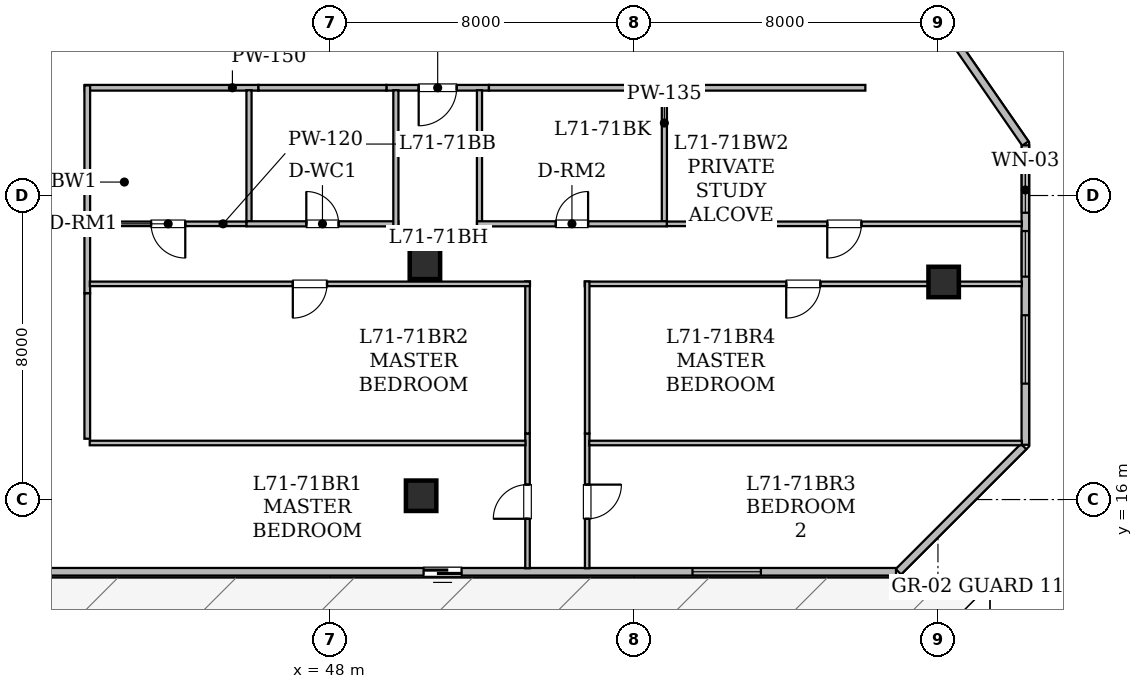
"""IFC4 building model, lengths in metres.
Left out: names, types, materials, properties, quantities, classifications, styles, units other than length and angle.
Written with IfcOpenShell. Run it as: python <this file> out.ifc"""

import sys

from ifc_helpers import new_model, si_unit, direction, frame, frame_2d, origin, origin_2d, place, context, subcontext, project, spatial, rectangle, hollow_rectangle, extrude, element, fill, save


model = new_model("IFC4")
c1 = context("Model", 3, precision=1e-05, world=origin(), true_north=direction((0.0, 1.0)))
c2 = subcontext(c1, "Body", "Model", "MODEL_VIEW")
j1 = project(units=[si_unit("LENGTHUNIT", "METRE"), si_unit("PLANEANGLEUNIT", "RADIAN")], contexts=[c1])
p1 = place(None, origin())
s1 = spatial("IfcSite", under=j1, at=p1, CompositionType="ELEMENT")
p2 = place(p1, origin())
s2 = spatial("IfcBuilding", under=s1, at=p2, CompositionType="ELEMENT")
p3 = place(p2, frame((0.0, 0.0, 277.85)))
s3 = spatial("IfcBuildingStorey", under=s2, at=p3, CompositionType="ELEMENT", Elevation=277.85)
for number, where, z_axis, x_axis in (
    (1, (50.4, 16.1, 0.025), (0.0, 0.0, 1.0), (1.0, 0.0, 0.0)),
    (2, (61.2, 16.1, 0.025), (0.0, 0.0, 1.0), (1.0, 0.0, 0.0)),
    (3, (64.15, 21.725, 0.025), (0.0, 0.0, 1.0), (1.0, 0.0, 0.0)),
):
    element("IfcColumn", number, at=place(p3, frame(where, z_axis=z_axis, x_axis=x_axis)), inside=s3, PredefinedType="COLUMN", context=c2, shape_type="SweptSolid", body=[
        extrude(hollow_rectangle(XDim=0.8, YDim=0.8, WallThickness=0.04, at=origin_2d()), origin(), (0.0, 0.0, 1.0), 4.175),
    ])
p4 = place(p3, frame((50.5, 22.2, 0.0), z_axis=(0.0, 0.0, 1.0), x_axis=(1.0, 0.0, 0.0)))
e4 = element("IfcColumn", 4, at=p4, inside=s3, PredefinedType="COLUMN", context=c2, shape_type="SweptSolid", body=[
    extrude(hollow_rectangle(XDim=0.8, YDim=0.8, WallThickness=0.04, at=origin_2d()), origin(), (0.0, 0.0, 1.0), 4.2),
])
p5 = place(p3, frame((64.526, 27.931, 0.0), z_axis=(0.0, 0.0, 1.0), x_axis=(0.569311819154, -0.822121677473, 0.0)))
e5 = element("IfcWall", 5, at=p5, inside=s3, PredefinedType="STANDARD", context=c2, shape_type="SweptSolid", body=[
    extrude(rectangle(XDim=3.116, YDim=0.2, at=frame_2d((1.558, 0.0))), origin(), (0.0, 0.0, 1.0), 3.95),
])
p6 = place(p3, frame((66.3, 25.321, 0.0), z_axis=(0.0, 0.0, 1.0), x_axis=(0.0, -1.0, 0.0)))
e6 = element("IfcWall", 6, at=p6, inside=s3, PredefinedType="STANDARD", context=c2, shape_type="SweptSolid", body=[
    extrude(rectangle(XDim=7.88, YDim=0.2, at=frame_2d((3.94, 0.0))), origin(), (0.0, 0.0, 1.0), 3.95),
])
p7 = place(p6, frame((0.575, 0.0, 0.78)))
e7 = element("IfcOpeningElement", 7, at=p7, cuts=e6, PredefinedType="OPENING", context=c2, shape_type="SweptSolid", body=[
    extrude(rectangle(XDim=1.2, YDim=1.5, at=frame_2d((0.6, 0.75))), frame((0.0, 0.11, 0.0), z_axis=(0.0, -1.0, 0.0), x_axis=(1.0, 0.0, 0.0)), (0.0, 0.0, 1.0), 0.22),
])
p8 = place(p6, frame((2.256, 0.0, 0.78)))
e8 = element("IfcOpeningElement", 8, at=p8, cuts=e6, PredefinedType="OPENING", context=c2, shape_type="SweptSolid", body=[
    extrude(rectangle(XDim=1.2, YDim=1.5, at=frame_2d((0.6, 0.75))), frame((0.0, 0.11, 0.0), z_axis=(0.0, -1.0, 0.0), x_axis=(1.0, 0.0, 0.0)), (0.0, 0.0, 1.0), 0.22),
])
p9 = place(p6, frame((4.471, 0.0, 0.85)))
e9 = element("IfcOpeningElement", 9, at=p9, cuts=e6, PredefinedType="OPENING", context=c2, shape_type="SweptSolid", body=[
    extrude(rectangle(XDim=1.8, YDim=0.92, at=frame_2d((0.9, 0.46))), frame((0.0, 0.11, 0.0), z_axis=(0.0, -1.0, 0.0), x_axis=(1.0, 0.0, 0.0)), (0.0, 0.0, 1.0), 0.22),
])
p10 = place(p3, frame((66.255, 17.396, 0.0), z_axis=(0.0, 0.0, 1.0), x_axis=(-0.707106781187, -0.707106781187, 0.0)))
e10 = element("IfcWall", 10, at=p10, inside=s3, PredefinedType="STANDARD", context=c2, shape_type="SweptSolid", body=[
    extrude(rectangle(XDim=4.661, YDim=0.2, at=frame_2d((2.331, 0.0))), origin(), (0.0, 0.0, 1.0), 3.95),
])
p11 = place(p3, frame((62.896, 14.1, 0.0), z_axis=(0.0, 0.0, 1.0), x_axis=(-1.0, 0.0, 0.0)))
e11 = element("IfcWall", 11, at=p11, inside=s3, PredefinedType="STANDARD", context=c2, shape_type="SweptSolid", body=[
    extrude(rectangle(XDim=35.793, YDim=0.2, at=frame_2d((17.896, 0.0))), origin(), (0.0, 0.0, 1.0), 3.95),
])
p12 = place(p11, frame((11.431, 0.0, 0.0)))
e12 = element("IfcOpeningElement", 12, at=p12, cuts=e11, PredefinedType="OPENING", context=c2, shape_type="SweptSolid", body=[
    extrude(rectangle(XDim=1.0, YDim=2.15, at=frame_2d((0.5, 1.075))), frame((0.0, 0.11, 0.0), z_axis=(0.0, -1.0, 0.0), x_axis=(1.0, 0.0, 0.0)), (0.0, 0.0, 1.0), 0.22),
])
p13 = place(p11, frame((3.555, 0.0, 0.85)))
e13 = element("IfcOpeningElement", 13, at=p13, cuts=e11, PredefinedType="OPENING", context=c2, shape_type="SweptSolid", body=[
    extrude(rectangle(XDim=1.8, YDim=0.92, at=frame_2d((0.9, 0.46))), frame((0.0, 0.11, 0.0), z_axis=(0.0, -1.0, 0.0), x_axis=(1.0, 0.0, 0.0)), (0.0, 0.0, 1.0), 0.22),
])
p14 = place(p3, frame((46.12, 26.835, 0.0), z_axis=(0.0, 0.0, 1.0), x_axis=(-1.0, 0.0, 0.0)))
e14 = element("IfcWall", 14, at=p14, inside=s3, PredefinedType="STANDARD", context=c2, shape_type="SweptSolid", body=[
    extrude(rectangle(XDim=4.57, YDim=0.15, at=frame_2d((2.285, 0.0))), origin(), (0.0, 0.0, 1.0), 3.95),
])
p15 = place(p3, frame((41.615, 26.898, 0.0), z_axis=(0.0, 0.0, 1.0), x_axis=(0.0, -1.0, 0.0)))
e15 = element("IfcWall", 15, at=p15, inside=s3, PredefinedType="STANDARD", context=c2, shape_type="SweptSolid", body=[
    extrude(rectangle(XDim=3.892, YDim=0.15, at=frame_2d((1.946, 0.0))), origin(), (0.0, 0.0, 1.0), 3.245),
])
p16 = place(p3, frame((62.09, 26.835, 0.0), z_axis=(0.0, 0.0, 1.0), x_axis=(-1.0, 0.0, 0.0)))
e16 = element("IfcWall", 16, at=p16, inside=s3, PredefinedType="STANDARD", context=c2, shape_type="SweptSolid", body=[
    extrude(rectangle(XDim=5.538, YDim=0.15, at=frame_2d((2.769, 0.0))), origin(), (0.0, 0.0, 1.0), 3.95),
])
p17 = place(p3, frame((52.185, 26.835, 0.0), z_axis=(0.0, 0.0, 1.0), x_axis=(-1.0, 0.0, 0.0)))
e17 = element("IfcWall", 17, at=p17, inside=s3, PredefinedType="STANDARD", context=c2, shape_type="SweptSolid", body=[
    extrude(rectangle(XDim=2.698, YDim=0.15, at=frame_2d((1.349, 0.0))), origin(), (0.0, 0.0, 1.0), 3.245),
])
p18 = place(p17, frame((0.849, 0.0, 0.0)))
e18 = element("IfcOpeningElement", 18, at=p18, cuts=e17, PredefinedType="OPENING", context=c2, shape_type="SweptSolid", body=[
    extrude(rectangle(XDim=1.0, YDim=2.15, at=frame_2d((0.5, 1.075))), frame((0.0, 0.085, 0.0), z_axis=(0.0, -1.0, 0.0), x_axis=(1.0, 0.0, 0.0)), (0.0, 0.0, 1.0), 0.17),
])
p19 = place(p3, frame((41.615, 23.006, 0.0), z_axis=(0.0, 0.0, 1.0), x_axis=(0.0, -1.0, 0.0)))
e19 = element("IfcWall", 19, at=p19, inside=s3, PredefinedType="STANDARD", context=c2, shape_type="SweptSolid", body=[
    extrude(rectangle(XDim=1.58, YDim=0.15, at=frame_2d((0.79, 0.0))), origin(), (0.0, 0.0, 1.0), 3.95),
])
p20 = place(p3, frame((49.487, 26.835, 0.0), z_axis=(0.0, 0.0, 1.0), x_axis=(-1.0, 0.0, 0.0)))
e20 = element("IfcWall", 20, at=p20, inside=s3, PredefinedType="STANDARD", context=c2, shape_type="SweptSolid", body=[
    extrude(rectangle(XDim=3.367, YDim=0.15, at=frame_2d((1.684, 0.0))), origin(), (0.0, 0.0, 1.0), 3.95),
])
p21 = place(p3, frame((56.552, 26.835, 0.0), z_axis=(0.0, 0.0, 1.0), x_axis=(-1.0, 0.0, 0.0)))
e21 = element("IfcWall", 21, at=p21, inside=s3, PredefinedType="STANDARD", context=c2, shape_type="SweptSolid", body=[
    extrude(rectangle(XDim=4.367, YDim=0.15, at=frame_2d((2.184, 0.0))), origin(), (0.0, 0.0, 1.0), 3.95),
])
p22 = place(p3, frame((41.615, 21.426, 0.0), z_axis=(0.0, 0.0, 1.0), x_axis=(0.0, -1.0, 0.0)))
e22 = element("IfcWall", 22, at=p22, inside=s3, PredefinedType="STANDARD", context=c2, shape_type="SweptSolid", body=[
    extrude(rectangle(XDim=3.826, YDim=0.15, at=frame_2d((1.913, 0.0))), origin(), (0.0, 0.0, 1.0), 3.95),
])
p23 = place(p3, frame((45.806, 23.255, 0.0), z_axis=(0.0, 0.0, 1.0), x_axis=(-1.0, 0.0, 0.0)))
e23 = element("IfcWall", 23, at=p23, inside=s3, PredefinedType="PARTITIONING", context=c2, shape_type="SweptSolid", body=[
    extrude(rectangle(XDim=4.124, YDim=0.12, at=frame_2d((2.062, 0.0))), origin(), (0.0, 0.0, 1.0), 3.245),
])
p24 = place(p23, frame((1.612, 0.0, 0.0)))
e24 = element("IfcOpeningElement", 24, at=p24, cuts=e23, PredefinedType="OPENING", context=c2, shape_type="SweptSolid", body=[
    extrude(rectangle(XDim=0.9, YDim=2.1, at=frame_2d((0.45, 1.05))), frame((0.0, 0.07, 0.0), z_axis=(0.0, -1.0, 0.0), x_axis=(1.0, 0.0, 0.0)), (0.0, 0.0, 1.0), 0.14),
])
p25 = place(p3, frame((45.871, 26.77, 0.0), z_axis=(0.0, 0.0, 1.0), x_axis=(0.0, -1.0, 0.0)))
e25 = element("IfcWall", 25, at=p25, inside=s3, PredefinedType="PARTITIONING", context=c2, shape_type="SweptSolid", body=[
    extrude(rectangle(XDim=3.45, YDim=0.135, at=frame_2d((1.725, 0.0))), origin(), (0.0, 0.0, 1.0), 3.95),
])
p26 = place(p3, frame((66.208, 23.255, 0.0), z_axis=(0.0, 0.0, 1.0), x_axis=(-1.0, 0.0, 0.0)))
e26 = element("IfcWall", 26, at=p26, inside=s3, PredefinedType="PARTITIONING", context=c2, shape_type="SweptSolid", body=[
    extrude(rectangle(XDim=9.342, YDim=0.12, at=frame_2d((4.671, 0.0))), origin(), (0.0, 0.0, 1.0), 3.407),
])
p27 = place(p26, frame((4.221, 0.0, 0.0)))
e27 = element("IfcOpeningElement", 27, at=p27, cuts=e26, PredefinedType="OPENING", context=c2, shape_type="SweptSolid", body=[
    extrude(rectangle(XDim=0.9, YDim=2.1, at=frame_2d((0.45, 1.05))), frame((0.0, 0.07, 0.0), z_axis=(0.0, -1.0, 0.0), x_axis=(1.0, 0.0, 0.0)), (0.0, 0.0, 1.0), 0.14),
])
p28 = place(p3, frame((56.801, 23.32, 0.0), z_axis=(0.0, 0.0, 1.0), x_axis=(0.0, 1.0, 0.0)))
e28 = element("IfcWall", 28, at=p28, inside=s3, PredefinedType="PARTITIONING", context=c2, shape_type="SweptSolid", body=[
    extrude(rectangle(XDim=3.45, YDim=0.135, at=frame_2d((1.725, 0.0))), origin(), (0.0, 0.0, 1.0), 3.95),
])
p29 = place(p3, frame((45.806, 23.255, 0.0), z_axis=(0.0, 0.0, 1.0), x_axis=(1.0, 0.0, 0.0)))
e29 = element("IfcWall", 29, at=p29, inside=s3, PredefinedType="PARTITIONING", context=c2, shape_type="SweptSolid", body=[
    extrude(rectangle(XDim=3.995, YDim=0.135, at=frame_2d((1.998, 0.0))), origin(), (0.0, 0.0, 1.0), 3.245),
])
p30 = place(p29, frame((1.573, 0.0, 0.0)))
e30 = element("IfcOpeningElement", 30, at=p30, cuts=e29, PredefinedType="OPENING", context=c2, shape_type="SweptSolid", body=[
    extrude(rectangle(XDim=0.85, YDim=2.1, at=frame_2d((0.425, 1.05))), frame((0.0, 0.077, 0.0), z_axis=(0.0, -1.0, 0.0), x_axis=(1.0, 0.0, 0.0)), (0.0, 0.0, 1.0), 0.155),
])
for number, where, z_axis, x_axis in (
    (31, (49.736, 23.19, 0.0), (0.0, 0.0, 1.0), (0.0, 1.0, 0.0)),
    (32, (51.936, 26.77, 0.0), (0.0, 0.0, 1.0), (0.0, -1.0, 0.0)),
):
    element("IfcWall", number, at=place(p3, frame(where, z_axis=z_axis, x_axis=x_axis)), inside=s3, PredefinedType="PARTITIONING", context=c2, shape_type="SweptSolid", body=[
        extrude(rectangle(XDim=3.58, YDim=0.135, at=frame_2d((1.79, 0.0))), origin(), (0.0, 0.0, 1.0), 3.95),
    ])
p31 = place(p3, frame((51.871, 23.255, 0.0), z_axis=(0.0, 0.0, 1.0), x_axis=(1.0, 0.0, 0.0)))
e33 = element("IfcWall", 33, at=p31, inside=s3, PredefinedType="PARTITIONING", context=c2, shape_type="SweptSolid", body=[
    extrude(rectangle(XDim=4.995, YDim=0.135, at=frame_2d((2.498, 0.0))), origin(), (0.0, 0.0, 1.0), 3.95),
])
p32 = place(p31, frame((2.073, 0.0, 0.0)))
e34 = element("IfcOpeningElement", 34, at=p32, cuts=e33, PredefinedType="OPENING", context=c2, shape_type="SweptSolid", body=[
    extrude(rectangle(XDim=0.85, YDim=2.1, at=frame_2d((0.425, 1.05))), frame((0.0, 0.077, 0.0), z_axis=(0.0, -1.0, 0.0), x_axis=(1.0, 0.0, 0.0)), (0.0, 0.0, 1.0), 0.155),
])
p33 = place(p3, frame((53.2, 14.192, 0.0), z_axis=(0.0, 0.0, 1.0), x_axis=(0.0, 1.0, 0.0)))
e35 = element("IfcWall", 35, at=p33, inside=s3, PredefinedType="PARTITIONING", context=c2, shape_type="SweptSolid", body=[
    extrude(rectangle(XDim=3.546, YDim=0.12, at=frame_2d((1.773, 0.0))), origin(), (0.0, 0.0, 1.0), 3.407),
])
p34 = place(p33, frame((1.302, 0.0, 0.0)))
e36 = element("IfcOpeningElement", 36, at=p34, cuts=e35, PredefinedType="OPENING", context=c2, shape_type="SweptSolid", body=[
    extrude(rectangle(XDim=0.9, YDim=2.1, at=frame_2d((0.45, 1.05))), frame((0.0, 0.07, 0.0), z_axis=(0.0, -1.0, 0.0), x_axis=(1.0, 0.0, 0.0)), (0.0, 0.0, 1.0), 0.14),
])
p35 = place(p3, frame((53.2, 17.738, 0.0), z_axis=(0.0, 0.0, 1.0), x_axis=(0.0, 1.0, 0.0)))
e37 = element("IfcWall", 37, at=p35, inside=s3, PredefinedType="PARTITIONING", context=c2, shape_type="SweptSolid", body=[
    extrude(rectangle(XDim=4.002, YDim=0.12, at=frame_2d((2.001, 0.0))), origin(), (0.0, 0.0, 1.0), 3.245),
])
p36 = place(p3, frame((53.265, 21.675, 0.0), z_axis=(0.0, 0.0, 1.0), x_axis=(-1.0, 0.0, 0.0)))
e38 = element("IfcWall", 38, at=p36, inside=s3, PredefinedType="PARTITIONING", context=c2, shape_type="SweptSolid", body=[
    extrude(rectangle(XDim=11.583, YDim=0.12, at=frame_2d((5.792, 0.0))), origin(), (0.0, 0.0, 1.0), 3.245),
])
p37 = place(p36, frame((5.341, 0.0, 0.0)))
e39 = element("IfcOpeningElement", 39, at=p37, cuts=e38, PredefinedType="OPENING", context=c2, shape_type="SweptSolid", body=[
    extrude(rectangle(XDim=0.9, YDim=2.1, at=frame_2d((0.45, 1.05))), frame((0.0, 0.07, 0.0), z_axis=(0.0, -1.0, 0.0), x_axis=(1.0, 0.0, 0.0)), (0.0, 0.0, 1.0), 0.14),
])
p38 = place(p3, frame((54.77, 17.738, 0.0), z_axis=(0.0, 0.0, 1.0), x_axis=(0.0, -1.0, 0.0)))
e40 = element("IfcWall", 40, at=p38, inside=s3, PredefinedType="PARTITIONING", context=c2, shape_type="SweptSolid", body=[
    extrude(rectangle(XDim=3.546, YDim=0.12, at=frame_2d((1.773, 0.0))), origin(), (0.0, 0.0, 1.0), 3.407),
])
p39 = place(p38, frame((1.345, 0.0, 0.0)))
e41 = element("IfcOpeningElement", 41, at=p39, cuts=e40, PredefinedType="OPENING", context=c2, shape_type="SweptSolid", body=[
    extrude(rectangle(XDim=0.9, YDim=2.1, at=frame_2d((0.45, 1.05))), frame((0.0, 0.07, 0.0), z_axis=(0.0, -1.0, 0.0), x_axis=(1.0, 0.0, 0.0)), (0.0, 0.0, 1.0), 0.14),
])
p40 = place(p3, frame((66.208, 21.675, 0.0), z_axis=(0.0, 0.0, 1.0), x_axis=(-1.0, 0.0, 0.0)))
e42 = element("IfcWall", 42, at=p40, inside=s3, PredefinedType="PARTITIONING", context=c2, shape_type="SweptSolid", body=[
    extrude(rectangle(XDim=11.503, YDim=0.12, at=frame_2d((5.751, 0.0))), origin(), (0.0, 0.0, 1.0), 3.245),
])
p41 = place(p40, frame((5.301, 0.0, 0.0)))
e43 = element("IfcOpeningElement", 43, at=p41, cuts=e42, PredefinedType="OPENING", context=c2, shape_type="SweptSolid", body=[
    extrude(rectangle(XDim=0.9, YDim=2.1, at=frame_2d((0.45, 1.05))), frame((0.0, 0.07, 0.0), z_axis=(0.0, -1.0, 0.0), x_axis=(1.0, 0.0, 0.0)), (0.0, 0.0, 1.0), 0.14),
])
p42 = place(p3, frame((54.77, 21.74, 0.0), z_axis=(0.0, 0.0, 1.0), x_axis=(0.0, -1.0, 0.0)))
e44 = element("IfcWall", 44, at=p42, inside=s3, PredefinedType="PARTITIONING", context=c2, shape_type="SweptSolid", body=[
    extrude(rectangle(XDim=4.002, YDim=0.12, at=frame_2d((2.001, 0.0))), origin(), (0.0, 0.0, 1.0), 3.245),
])
p43 = place(p3, frame((41.68, 17.488, 0.0), z_axis=(0.0, 0.0, 1.0), x_axis=(1.0, 0.0, 0.0)))
e45 = element("IfcWall", 45, at=p43, inside=s3, PredefinedType="PARTITIONING", context=c2, shape_type="SweptSolid", body=[
    extrude(rectangle(XDim=11.466, YDim=0.12, at=frame_2d((5.733, 0.0))), origin(), (0.0, 0.0, 1.0), 3.245),
])
p44 = place(p3, frame((54.824, 17.488, 0.0), z_axis=(0.0, 0.0, 1.0), x_axis=(1.0, 0.0, 0.0)))
e46 = element("IfcWall", 46, at=p44, inside=s3, PredefinedType="PARTITIONING", context=c2, shape_type="SweptSolid", body=[
    extrude(rectangle(XDim=11.384, YDim=0.12, at=frame_2d((5.692, 0.0))), origin(), (0.0, 0.0, 1.0), 3.245),
])
p45 = place(p12, origin())
e47 = element("IfcDoor", 47, at=p45, inside=s3, OperationType="SLIDING_TO_LEFT", PredefinedType="DOOR", context=c2, shape_type="SweptSolid", body=[
    extrude(rectangle(XDim=1.0, YDim=2.15, at=frame_2d((0.5, 1.075))), frame((0.0, 0.025, 0.0), z_axis=(0.0, -1.0, 0.0), x_axis=(1.0, 0.0, 0.0)), (0.0, 0.0, 1.0), 0.05),
])
fill(e12, e47)
p46 = place(p7, origin())
e48 = element("IfcWindow", 48, at=p46, inside=s3, PartitioningType="SINGLE_PANEL", PredefinedType="WINDOW", context=c2, shape_type="SweptSolid", body=[
    extrude(rectangle(XDim=1.2, YDim=1.5, at=frame_2d((0.6, 0.75))), frame((0.0, 0.03, 0.0), z_axis=(0.0, -1.0, 0.0), x_axis=(1.0, 0.0, 0.0)), (0.0, 0.0, 1.0), 0.06),
])
fill(e7, e48)
p47 = place(p8, origin())
e49 = element("IfcWindow", 49, at=p47, inside=s3, PartitioningType="SINGLE_PANEL", PredefinedType="WINDOW", context=c2, shape_type="SweptSolid", body=[
    extrude(rectangle(XDim=1.2, YDim=1.5, at=frame_2d((0.6, 0.75))), frame((0.0, 0.03, 0.0), z_axis=(0.0, -1.0, 0.0), x_axis=(1.0, 0.0, 0.0)), (0.0, 0.0, 1.0), 0.06),
])
fill(e8, e49)
p48 = place(p13, origin())
e50 = element("IfcWindow", 50, at=p48, inside=s3, PartitioningType="SINGLE_PANEL", PredefinedType="WINDOW", context=c2, shape_type="SweptSolid", body=[
    extrude(rectangle(XDim=1.8, YDim=0.92, at=frame_2d((0.9, 0.46))), frame((0.0, 0.03, 0.0), z_axis=(0.0, -1.0, 0.0), x_axis=(1.0, 0.0, 0.0)), (0.0, 0.0, 1.0), 0.06),
])
fill(e13, e50)
p49 = place(p9, origin())
e51 = element("IfcWindow", 51, at=p49, inside=s3, PartitioningType="SINGLE_PANEL", PredefinedType="WINDOW", context=c2, shape_type="SweptSolid", body=[
    extrude(rectangle(XDim=1.8, YDim=0.92, at=frame_2d((0.9, 0.46))), frame((0.0, 0.03, 0.0), z_axis=(0.0, -1.0, 0.0), x_axis=(1.0, 0.0, 0.0)), (0.0, 0.0, 1.0), 0.06),
])
fill(e9, e51)
p50 = place(p18, origin())
e52 = element("IfcDoor", 52, at=p50, inside=s3, OperationType="SINGLE_SWING_RIGHT", PredefinedType="DOOR", context=c2, shape_type="SweptSolid", body=[
    extrude(rectangle(XDim=1.0, YDim=2.15, at=frame_2d((0.5, 1.075))), frame((0.0, 0.025, 0.0), z_axis=(0.0, -1.0, 0.0), x_axis=(1.0, 0.0, 0.0)), (0.0, 0.0, 1.0), 0.05),
])
fill(e18, e52)
p51 = place(p24, origin())
e53 = element("IfcDoor", 53, at=p51, inside=s3, OperationType="SINGLE_SWING_LEFT", PredefinedType="DOOR", context=c2, shape_type="SweptSolid", body=[
    extrude(rectangle(XDim=0.9, YDim=2.1, at=frame_2d((0.45, 1.05))), frame((0.0, 0.025, 0.0), z_axis=(0.0, -1.0, 0.0), x_axis=(1.0, 0.0, 0.0)), (0.0, 0.0, 1.0), 0.05),
])
fill(e24, e53)
p52 = place(p27, origin())
e54 = element("IfcDoor", 54, at=p52, inside=s3, OperationType="SINGLE_SWING_RIGHT", PredefinedType="DOOR", context=c2, shape_type="SweptSolid", body=[
    extrude(rectangle(XDim=0.9, YDim=2.1, at=frame_2d((0.45, 1.05))), frame((0.0, 0.025, 0.0), z_axis=(0.0, -1.0, 0.0), x_axis=(1.0, 0.0, 0.0)), (0.0, 0.0, 1.0), 0.05),
])
fill(e27, e54)
p53 = place(p30, origin())
e55 = element("IfcDoor", 55, at=p53, inside=s3, OperationType="SINGLE_SWING_LEFT", PredefinedType="DOOR", context=c2, shape_type="SweptSolid", body=[
    extrude(rectangle(XDim=0.85, YDim=2.1, at=frame_2d((0.425, 1.05))), frame((0.0, 0.025, 0.0), z_axis=(0.0, -1.0, 0.0), x_axis=(1.0, 0.0, 0.0)), (0.0, 0.0, 1.0), 0.05),
])
fill(e30, e55)
p54 = place(p32, origin())
e56 = element("IfcDoor", 56, at=p54, inside=s3, OperationType="SINGLE_SWING_RIGHT", PredefinedType="DOOR", context=c2, shape_type="SweptSolid", body=[
    extrude(rectangle(XDim=0.85, YDim=2.1, at=frame_2d((0.425, 1.05))), frame((0.0, 0.025, 0.0), z_axis=(0.0, -1.0, 0.0), x_axis=(1.0, 0.0, 0.0)), (0.0, 0.0, 1.0), 0.05),
])
fill(e34, e56)
p55 = place(p34, origin())
e57 = element("IfcDoor", 57, at=p55, inside=s3, OperationType="SINGLE_SWING_LEFT", PredefinedType="DOOR", context=c2, shape_type="SweptSolid", body=[
    extrude(rectangle(XDim=0.9, YDim=2.1, at=frame_2d((0.45, 1.05))), frame((0.0, 0.025, 0.0), z_axis=(0.0, -1.0, 0.0), x_axis=(1.0, 0.0, 0.0)), (0.0, 0.0, 1.0), 0.05),
])
fill(e36, e57)
p56 = place(p37, origin())
e58 = element("IfcDoor", 58, at=p56, inside=s3, OperationType="SINGLE_SWING_RIGHT", PredefinedType="DOOR", context=c2, shape_type="SweptSolid", body=[
    extrude(rectangle(XDim=0.9, YDim=2.1, at=frame_2d((0.45, 1.05))), frame((0.0, 0.025, 0.0), z_axis=(0.0, -1.0, 0.0), x_axis=(1.0, 0.0, 0.0)), (0.0, 0.0, 1.0), 0.05),
])
fill(e39, e58)
p57 = place(p39, origin())
e59 = element("IfcDoor", 59, at=p57, inside=s3, OperationType="SINGLE_SWING_LEFT", PredefinedType="DOOR", context=c2, shape_type="SweptSolid", body=[
    extrude(rectangle(XDim=0.9, YDim=2.1, at=frame_2d((0.45, 1.05))), frame((0.0, 0.025, 0.0), z_axis=(0.0, -1.0, 0.0), x_axis=(1.0, 0.0, 0.0)), (0.0, 0.0, 1.0), 0.05),
])
fill(e41, e59)
p58 = place(p41, origin())
e60 = element("IfcDoor", 60, at=p58, inside=s3, OperationType="SINGLE_SWING_RIGHT", PredefinedType="DOOR", context=c2, shape_type="SweptSolid", body=[
    extrude(rectangle(XDim=0.9, YDim=2.1, at=frame_2d((0.45, 1.05))), frame((0.0, 0.025, 0.0), z_axis=(0.0, -1.0, 0.0), x_axis=(1.0, 0.0, 0.0)), (0.0, 0.0, 1.0), 0.05),
])
fill(e43, e60)
save(model, sys.argv[1])
